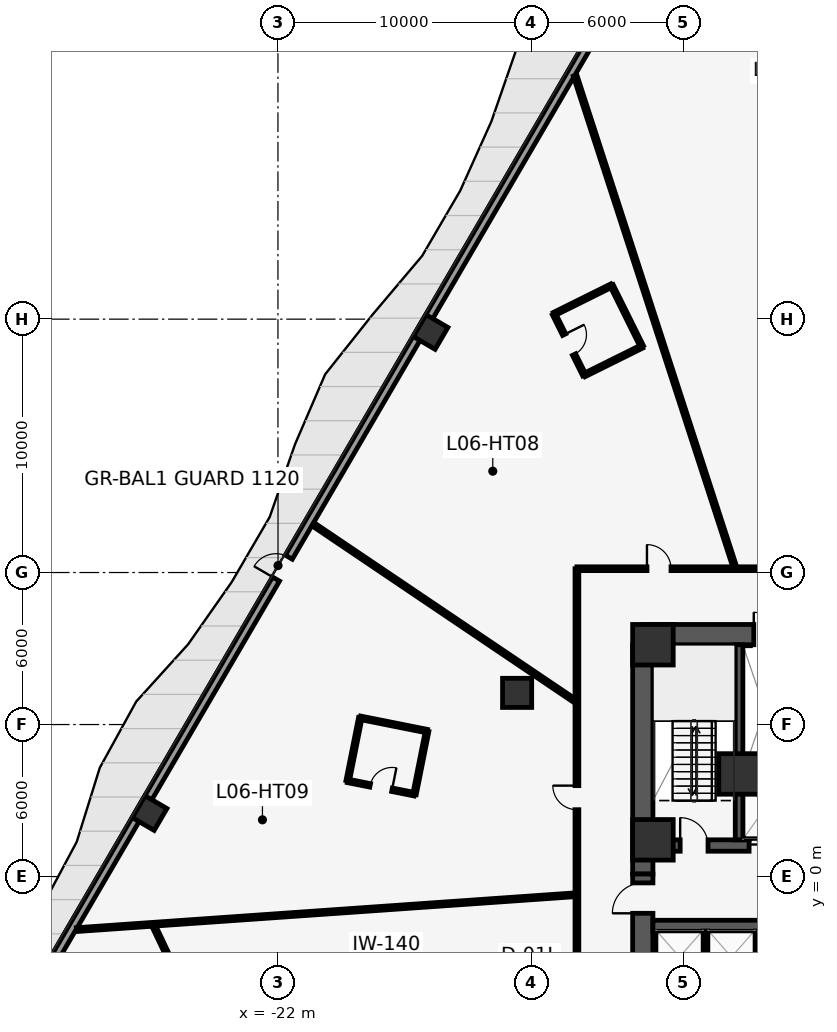
"""IFC4 building model, lengths in metres.
Left out: names, types, materials, properties, quantities, classifications, styles, units other than length and angle.
Written with IfcOpenShell. Run it as: python <this file> out.ifc"""

import sys

from ifc_helpers import new_model, si_unit, direction, frame, frame_2d, origin, origin_2d, place, context, subcontext, project, spatial, rectangle, hollow_rectangle, extrude, element, fill, save


model = new_model("IFC4")
c1 = context("Model", 3, precision=1e-05, world=origin(), true_north=direction((0.0, 1.0)))
c2 = subcontext(c1, "Body", "Model", "MODEL_VIEW")
j1 = project(units=[si_unit("LENGTHUNIT", "METRE"), si_unit("PLANEANGLEUNIT", "RADIAN")], contexts=[c1])
p1 = place(None, origin())
s1 = spatial("IfcSite", under=j1, at=p1, CompositionType="ELEMENT")
p2 = place(p1, origin())
s2 = spatial("IfcBuilding", under=s1, at=p2, CompositionType="ELEMENT")
p3 = place(p2, frame((0.0, 0.0, 34.4)))
s3 = spatial("IfcBuildingStorey", under=s2, at=p3, CompositionType="ELEMENT", Elevation=34.4)
p4 = place(p3, frame((-7.6, 9.55, 0.0), z_axis=(0.0, 0.0, 1.0), x_axis=(1.0, 0.0, 0.0)))
e1 = element("IfcWall", 1, at=p4, inside=s3, PredefinedType="SHEAR", context=c2, shape_type="SweptSolid", body=[
    extrude(rectangle(XDim=15.2, YDim=0.8, at=frame_2d((7.6, 0.0))), origin(), (0.0, 0.0, 1.0), 3.75),
])
p5 = place(p4, frame((7.05, 0.0, 0.0)))
e2 = element("IfcOpeningElement", 2, at=p5, cuts=e1, PredefinedType="OPENING", context=c2, shape_type="SweptSolid", body=[
    extrude(rectangle(XDim=1.1, YDim=2.15, at=frame_2d((0.55, 1.075))), frame((0.0, 0.41, 0.0), z_axis=(0.0, -1.0, 0.0), x_axis=(1.0, 0.0, 0.0)), (0.0, 0.0, 1.0), 0.82),
])
p6 = place(p4, frame((4.38, 0.0, 0.0)))
e3 = element("IfcOpeningElement", 3, at=p6, cuts=e1, PredefinedType="OPENING", context=c2, shape_type="SweptSolid", body=[
    extrude(rectangle(XDim=0.88, YDim=2.15, at=frame_2d((0.44, 1.075))), frame((0.0, 0.41, 0.0), z_axis=(0.0, -1.0, 0.0), x_axis=(1.0, 0.0, 0.0)), (0.0, 0.0, 1.0), 0.82),
])
p7 = place(p4, frame((9.94, 0.0, 0.0)))
e4 = element("IfcOpeningElement", 4, at=p7, cuts=e1, PredefinedType="OPENING", context=c2, shape_type="SweptSolid", body=[
    extrude(rectangle(XDim=0.88, YDim=2.15, at=frame_2d((0.44, 1.075))), frame((0.0, 0.41, 0.0), z_axis=(0.0, -1.0, 0.0), x_axis=(1.0, 0.0, 0.0)), (0.0, 0.0, 1.0), 0.82),
])
p8 = place(p3, frame((-7.2, 1.225, 0.0), z_axis=(0.0, 0.0, 1.0), x_axis=(1.0, 0.0, 0.0)))
e5 = element("IfcWall", 5, at=p8, inside=s3, PredefinedType="SHEAR", context=c2, shape_type="SweptSolid", body=[
    extrude(rectangle(XDim=14.4, YDim=0.45, at=frame_2d((7.2, 0.0))), origin(), (0.0, 0.0, 1.0), 3.75),
])
p9 = place(p8, frame((3.795, 0.0, 0.0)))
e6 = element("IfcOpeningElement", 6, at=p9, cuts=e5, PredefinedType="OPENING", context=c2, shape_type="SweptSolid", body=[
    extrude(rectangle(XDim=1.25, YDim=2.25, at=frame_2d((0.625, 1.125))), frame((0.0, 0.235, 0.0), z_axis=(0.0, -1.0, 0.0), x_axis=(1.0, 0.0, 0.0)), (0.0, 0.0, 1.0), 0.47),
])
p10 = place(p8, frame((9.355, 0.0, 0.0)))
e7 = element("IfcOpeningElement", 7, at=p10, cuts=e5, PredefinedType="OPENING", context=c2, shape_type="SweptSolid", body=[
    extrude(rectangle(XDim=1.25, YDim=2.25, at=frame_2d((0.625, 1.125))), frame((0.0, 0.235, 0.0), z_axis=(0.0, -1.0, 0.0), x_axis=(1.0, 0.0, 0.0)), (0.0, 0.0, 1.0), 0.47),
])
p11 = place(p8, frame((1.075, 0.0, 0.0)))
e8 = element("IfcOpeningElement", 8, at=p11, cuts=e5, PredefinedType="OPENING", context=c2, shape_type="SweptSolid", body=[
    extrude(rectangle(XDim=1.1, YDim=2.15, at=frame_2d((0.55, 1.075))), frame((0.0, 0.235, 0.0), z_axis=(0.0, -1.0, 0.0), x_axis=(1.0, 0.0, 0.0)), (0.0, 0.0, 1.0), 0.47),
])
p12 = place(p8, frame((12.225, 0.0, 0.0)))
e9 = element("IfcOpeningElement", 9, at=p12, cuts=e5, PredefinedType="OPENING", context=c2, shape_type="SweptSolid", body=[
    extrude(rectangle(XDim=1.1, YDim=2.15, at=frame_2d((0.55, 1.075))), frame((0.0, 0.235, 0.0), z_axis=(0.0, -1.0, 0.0), x_axis=(1.0, 0.0, 0.0)), (0.0, 0.0, 1.0), 0.47),
])
p13 = place(p3, frame((-3.8, 1.45, 0.0), z_axis=(0.0, 0.0, 1.0), x_axis=(0.0, 1.0, 0.0)))
e10 = element("IfcWall", 10, at=p13, inside=s3, PredefinedType="SHEAR", context=c2, shape_type="SweptSolid", body=[
    extrude(rectangle(XDim=7.7, YDim=0.3, at=frame_2d((3.85, 0.0))), origin(), (0.0, 0.0, 1.0), 3.75),
])
p14 = place(p3, frame((-7.6, 0.1, 0.0), z_axis=(0.0, 0.0, 1.0), x_axis=(0.0, 1.0, 0.0)))
e11 = element("IfcWall", 11, at=p14, inside=s3, PredefinedType="SHEAR", context=c2, shape_type="SweptSolid", body=[
    extrude(rectangle(XDim=9.05, YDim=0.8, at=frame_2d((4.525, 0.0))), origin(), (0.0, 0.0, 1.0), 3.75),
])
p15 = place(p3, frame((-7.6, -8.85, 0.0), z_axis=(0.0, 0.0, 1.0), x_axis=(0.0, 1.0, 0.0)))
e12 = element("IfcWall", 12, at=p15, inside=s3, PredefinedType="SHEAR", context=c2, shape_type="SweptSolid", body=[
    extrude(rectangle(XDim=8.95, YDim=0.8, at=frame_2d((4.475, 0.0))), origin(), (0.0, 0.0, 1.0), 3.75),
])
p16 = place(p15, frame((2.49, 0.0, 0.0)))
e13 = element("IfcOpeningElement", 13, at=p16, cuts=e12, PredefinedType="OPENING", context=c2, shape_type="SweptSolid", body=[
    extrude(rectangle(XDim=1.8, YDim=2.2, at=frame_2d((0.9, 1.1))), frame((0.0, 0.41, 0.0), z_axis=(0.0, -1.0, 0.0), x_axis=(1.0, 0.0, 0.0)), (0.0, 0.0, 1.0), 0.82),
])
p17 = place(p15, frame((7.4, 0.0, 0.0)))
e14 = element("IfcOpeningElement", 14, at=p17, cuts=e12, PredefinedType="OPENING", context=c2, shape_type="SweptSolid", body=[
    extrude(rectangle(XDim=1.2, YDim=2.15, at=frame_2d((0.6, 1.075))), frame((0.0, 0.41, 0.0), z_axis=(0.0, -1.0, 0.0), x_axis=(1.0, 0.0, 0.0)), (0.0, 0.0, 1.0), 0.82),
])
p18 = place(p3, frame((-7.2, -1.95, 0.0), z_axis=(0.0, 0.0, 1.0), x_axis=(1.0, 0.0, 0.0)))
e15 = element("IfcWall", 15, at=p18, inside=s3, PredefinedType="SHEAR", context=c2, shape_type="SweptSolid", body=[
    extrude(rectangle(XDim=14.4, YDim=0.45, at=frame_2d((7.2, 0.0))), origin(), (0.0, 0.0, 1.0), 3.75),
])
for number, where, z_axis, x_axis in (
    (16, (-7.2, 9.15, 0.0), (0.0, 0.0, 1.0), (1.0, 0.0, 0.0)),
    (17, (-7.2, 1.45, 0.0), (0.0, 0.0, 1.0), (1.0, 0.0, 0.0)),
    (18, (-3.8, 4.05, 0.0), (0.0, 0.0, 1.0), (1.0, 0.0, 0.0)),
):
    element("IfcColumn", number, at=place(p3, frame(where, z_axis=z_axis, x_axis=x_axis)), inside=s3, PredefinedType="COLUMN", context=c2, shape_type="SweptSolid", body=[
        extrude(rectangle(XDim=1.6, YDim=1.6, at=origin_2d()), origin(), (0.0, 0.0, 1.0), 4.0),
    ])
p19 = place(p3, frame((-12.56, 7.25, 0.0), z_axis=(0.0, 0.0, 1.0), x_axis=(1.0, 0.0, 0.0)))
e19 = element("IfcColumn", 19, at=p19, inside=s3, PredefinedType="COLUMN", context=c2, shape_type="SweptSolid", body=[
    extrude(rectangle(XDim=1.15, YDim=1.15, at=origin_2d()), origin(), (0.0, 0.0, 1.0), 4.0),
])
for number, where, z_axis, x_axis in (
    (20, (-15.976, 21.494, 0.0), (0.0, 0.0, 1.0), (0.504, 0.863, 0.0)),
    (21, (-27.065, 2.506, 0.0), (0.0, 0.0, 1.0), (0.504, 0.863, 0.0)),
):
    element("IfcColumn", number, at=place(p3, frame(where, z_axis=z_axis, x_axis=x_axis)), inside=s3, PredefinedType="COLUMN", context=c2, shape_type="SweptSolid", body=[
        extrude(hollow_rectangle(XDim=1.0, YDim=1.0, WallThickness=0.06, at=origin_2d()), origin(), (0.0, 0.0, 1.0), 4.0),
    ])
p20 = place(p3, frame((-38.726, -16.773, 0.0), z_axis=(0.0, 0.0, 1.0), x_axis=(0.504213113214, 0.863579258935, 0.0)))
e22 = element("IfcWall", 22, at=p20, inside=s3, PredefinedType="STANDARD", context=c2, shape_type="SweptSolid", body=[
    extrude(rectangle(XDim=67.041, YDim=0.32, at=frame_2d((33.521, 0.0))), origin(), (0.0, 0.0, 1.0), 3.75),
])
p21 = place(p20, frame((33.021, 0.0, 0.0)))
e23 = element("IfcOpeningElement", 23, at=p21, cuts=e22, PredefinedType="OPENING", context=c2, shape_type="SweptSolid", body=[
    extrude(rectangle(XDim=1.0, YDim=2.15, at=frame_2d((0.5, 1.075))), frame((0.0, 0.17, 0.0), z_axis=(0.0, -1.0, 0.0), x_axis=(1.0, 0.0, 0.0)), (0.0, 0.0, 1.0), 0.34),
])
p22 = place(p3, frame((-3.65, 4.05, 0.0), z_axis=(0.0, 0.0, 1.0), x_axis=(1.0, 0.0, 0.0)))
e24 = element("IfcWall", 24, at=p22, inside=s3, PredefinedType="PARTITIONING", context=c2, shape_type="SweptSolid", body=[
    extrude(rectangle(XDim=1.73, YDim=0.2, at=frame_2d((0.865, 0.0))), origin(), (0.0, 0.0, 1.0), 3.75),
])
for number, where, z_axis, x_axis in (
    (25, (-5.125, -4.18, 0.0), (0.0, 0.0, 1.0), (0.0, 1.0, 0.0)),
    (26, (-3.075, -4.18, 0.0), (0.0, 0.0, 1.0), (0.0, 1.0, 0.0)),
):
    element("IfcWall", number, at=place(p3, frame(where, z_axis=z_axis, x_axis=x_axis)), inside=s3, PredefinedType="PARTITIONING", context=c2, shape_type="SweptSolid", body=[
        extrude(rectangle(XDim=2.03, YDim=0.15, at=frame_2d((1.015, 0.0))), origin(), (0.0, 0.0, 1.0), 3.75),
    ])
p23 = place(p3, frame((-10.2, 12.15, 0.0), z_axis=(0.0, 0.0, 1.0), x_axis=(1.0, 0.0, 0.0)))
e27 = element("IfcWall", 27, at=p23, inside=s3, PredefinedType="PARTITIONING", context=c2, shape_type="SweptSolid", body=[
    extrude(rectangle(XDim=20.4, YDim=0.15, at=frame_2d((10.2, 0.0))), origin(), (0.0, 0.0, 1.0), 3.75),
])
p24 = place(p23, frame((16.686, 0.0, 0.0)))
e28 = element("IfcOpeningElement", 28, at=p24, cuts=e27, PredefinedType="OPENING", context=c2, shape_type="SweptSolid", body=[
    extrude(rectangle(XDim=0.95, YDim=2.15, at=frame_2d((0.475, 1.075))), frame((0.0, 0.085, 0.0), z_axis=(0.0, -1.0, 0.0), x_axis=(1.0, 0.0, 0.0)), (0.0, 0.0, 1.0), 0.17),
])
p25 = place(p23, frame((9.725, 0.0, 0.0)))
e29 = element("IfcOpeningElement", 29, at=p25, cuts=e27, PredefinedType="OPENING", context=c2, shape_type="SweptSolid", body=[
    extrude(rectangle(XDim=0.95, YDim=2.15, at=frame_2d((0.475, 1.075))), frame((0.0, 0.085, 0.0), z_axis=(0.0, -1.0, 0.0), x_axis=(1.0, 0.0, 0.0)), (0.0, 0.0, 1.0), 0.17),
])
p26 = place(p23, frame((2.764, 0.0, 0.0)))
e30 = element("IfcOpeningElement", 30, at=p26, cuts=e27, PredefinedType="OPENING", context=c2, shape_type="SweptSolid", body=[
    extrude(rectangle(XDim=0.95, YDim=2.15, at=frame_2d((0.475, 1.075))), frame((0.0, 0.085, 0.0), z_axis=(0.0, -1.0, 0.0), x_axis=(1.0, 0.0, 0.0)), (0.0, 0.0, 1.0), 0.17),
])
p27 = place(p3, frame((-10.2, -11.85, 0.0), z_axis=(0.0, 0.0, 1.0), x_axis=(0.0, 1.0, 0.0)))
e31 = element("IfcWall", 31, at=p27, inside=s3, PredefinedType="PARTITIONING", context=c2, shape_type="SweptSolid", body=[
    extrude(rectangle(XDim=24.0, YDim=0.15, at=frame_2d((12.0, 0.0))), origin(), (0.0, 0.0, 1.0), 3.75),
])
p28 = place(p27, frame((6.372, 0.0, 0.0)))
e32 = element("IfcOpeningElement", 32, at=p28, cuts=e31, PredefinedType="OPENING", context=c2, shape_type="SweptSolid", body=[
    extrude(rectangle(XDim=0.95, YDim=2.15, at=frame_2d((0.475, 1.075))), frame((0.0, 0.085, 0.0), z_axis=(0.0, -1.0, 0.0), x_axis=(1.0, 0.0, 0.0)), (0.0, 0.0, 1.0), 0.17),
])
p29 = place(p27, frame((14.489, 0.0, 0.0)))
e33 = element("IfcOpeningElement", 33, at=p29, cuts=e31, PredefinedType="OPENING", context=c2, shape_type="SweptSolid", body=[
    extrude(rectangle(XDim=0.95, YDim=2.15, at=frame_2d((0.475, 1.075))), frame((0.0, 0.085, 0.0), z_axis=(0.0, -1.0, 0.0), x_axis=(1.0, 0.0, 0.0)), (0.0, 0.0, 1.0), 0.17),
])
p30 = place(p3, frame((-3.982, 12.255, 0.0), z_axis=(0.0, 0.0, 1.0), x_axis=(-0.309011216684, 0.951058393561, 0.0)))
e34 = element("IfcWall", 34, at=p30, inside=s3, PredefinedType="PARTITIONING", context=c2, shape_type="SweptSolid", body=[
    extrude(rectangle(XDim=20.354, YDim=0.15, at=frame_2d((10.177, 0.0))), origin(), (0.0, 0.0, 1.0), 3.75),
])
p31 = place(p3, frame((-10.305, 6.951, 0.0), z_axis=(0.0, 0.0, 1.0), x_axis=(-0.829038255968, 0.559191890268, 0.0)))
e35 = element("IfcWall", 35, at=p31, inside=s3, PredefinedType="PARTITIONING", context=c2, shape_type="SweptSolid", body=[
    extrude(rectangle(XDim=12.433, YDim=0.15, at=frame_2d((6.216, 0.0))), origin(), (0.0, 0.0, 1.0), 3.75),
])
p32 = place(p3, frame((-10.305, -0.721, 0.0), z_axis=(0.0, 0.0, 1.0), x_axis=(-0.997564481565, -0.069750305525, 0.0)))
e36 = element("IfcWall", 36, at=p32, inside=s3, PredefinedType="PARTITIONING", context=c2, shape_type="SweptSolid", body=[
    extrude(rectangle(XDim=19.696, YDim=0.15, at=frame_2d((9.848, 0.0))), origin(), (0.0, 0.0, 1.0), 3.75),
])
p33 = place(p3, frame((-26.922, -1.908, 0.0), z_axis=(0.0, 0.0, 1.0), x_axis=(0.429066894507, -0.903272716314, 0.0)))
e37 = element("IfcWall", 37, at=p33, inside=s3, PredefinedType="PARTITIONING", context=c2, shape_type="SweptSolid", body=[
    extrude(rectangle(XDim=17.292, YDim=0.15, at=frame_2d((8.646, 0.0))), origin(), (0.0, 0.0, 1.0), 3.75),
])
p34 = place(p33, frame((8.171, 0.0, 0.0)))
e38 = element("IfcOpeningElement", 38, at=p34, cuts=e37, PredefinedType="OPENING", context=c2, shape_type="SweptSolid", body=[
    extrude(rectangle(XDim=0.95, YDim=2.15, at=frame_2d((0.475, 1.075))), frame((0.0, 0.085, 0.0), z_axis=(0.0, -1.0, 0.0), x_axis=(1.0, 0.0, 0.0)), (0.0, 0.0, 1.0), 0.17),
])
p35 = place(p3, frame((-7.635, 20.92, 0.0), z_axis=(0.0, 0.0, 1.0), x_axis=(-0.444598005218, 0.895730212595, 0.0)))
e39 = element("IfcWall", 39, at=p35, inside=s3, PredefinedType="PARTITIONING", context=c2, shape_type="SweptSolid", body=[
    extrude(rectangle(XDim=2.69, YDim=0.14, at=frame_2d((1.345, 0.0))), origin(), (0.0, 0.0, 1.0), 3.75),
])
p36 = place(p3, frame((-8.831, 23.33, 0.0), z_axis=(0.0, 0.0, 1.0), x_axis=(-0.895711445352, -0.444635813521, 0.0)))
e40 = element("IfcWall", 40, at=p36, inside=s3, PredefinedType="PARTITIONING", context=c2, shape_type="SweptSolid", body=[
    extrude(rectangle(XDim=2.54, YDim=0.14, at=frame_2d((1.27, 0.0))), origin(), (0.0, 0.0, 1.0), 3.75),
])
p37 = place(p3, frame((-11.106, 22.2, 0.0), z_axis=(0.0, 0.0, 1.0), x_axis=(0.444706961712, -0.895676123498, 0.0)))
e41 = element("IfcWall", 41, at=p37, inside=s3, PredefinedType="PARTITIONING", context=c2, shape_type="SweptSolid", body=[
    extrude(rectangle(XDim=2.69, YDim=0.14, at=frame_2d((1.345, 0.0))), origin(), (0.0, 0.0, 1.0), 3.75),
])
p38 = place(p37, frame((0.905, 0.0, 0.0)))
e42 = element("IfcOpeningElement", 42, at=p38, cuts=e41, PredefinedType="OPENING", context=c2, shape_type="SweptSolid", body=[
    extrude(rectangle(XDim=0.88, YDim=2.1, at=frame_2d((0.44, 1.05))), frame((0.0, 0.08, 0.0), z_axis=(0.0, -1.0, 0.0), x_axis=(1.0, 0.0, 0.0)), (0.0, 0.0, 1.0), 0.16),
])
p39 = place(p3, frame((-9.909, 19.791, 0.0), z_axis=(0.0, 0.0, 1.0), x_axis=(0.895730724579, 0.444596973726, 0.0)))
e43 = element("IfcWall", 43, at=p39, inside=s3, PredefinedType="PARTITIONING", context=c2, shape_type="SweptSolid", body=[
    extrude(rectangle(XDim=2.54, YDim=0.14, at=frame_2d((1.27, 0.0))), origin(), (0.0, 0.0, 1.0), 3.75),
])
p40 = place(p3, frame((-16.112, 5.74, 0.0), z_axis=(0.0, 0.0, 1.0), x_axis=(-0.980615566205, 0.195941601799, 0.0)))
e44 = element("IfcWall", 44, at=p40, inside=s3, PredefinedType="PARTITIONING", context=c2, shape_type="SweptSolid", body=[
    extrude(rectangle(XDim=2.69, YDim=0.14, at=frame_2d((1.345, 0.0))), origin(), (0.0, 0.0, 1.0), 3.75),
])
p41 = place(p3, frame((-18.75, 6.267, 0.0), z_axis=(0.0, 0.0, 1.0), x_axis=(-0.195986742402, -0.98060654536, 0.0)))
e45 = element("IfcWall", 45, at=p41, inside=s3, PredefinedType="PARTITIONING", context=c2, shape_type="SweptSolid", body=[
    extrude(rectangle(XDim=2.54, YDim=0.14, at=frame_2d((1.27, 0.0))), origin(), (0.0, 0.0, 1.0), 3.75),
])
p42 = place(p3, frame((-19.248, 3.776, 0.0), z_axis=(0.0, 0.0, 1.0), x_axis=(0.980615566205, -0.195941601799, 0.0)))
e46 = element("IfcWall", 46, at=p42, inside=s3, PredefinedType="PARTITIONING", context=c2, shape_type="SweptSolid", body=[
    extrude(rectangle(XDim=2.69, YDim=0.14, at=frame_2d((1.345, 0.0))), origin(), (0.0, 0.0, 1.0), 3.75),
])
p43 = place(p42, frame((0.905, 0.0, 0.0)))
e47 = element("IfcOpeningElement", 47, at=p43, cuts=e46, PredefinedType="OPENING", context=c2, shape_type="SweptSolid", body=[
    extrude(rectangle(XDim=0.88, YDim=2.1, at=frame_2d((0.44, 1.05))), frame((0.0, 0.08, 0.0), z_axis=(0.0, -1.0, 0.0), x_axis=(1.0, 0.0, 0.0)), (0.0, 0.0, 1.0), 0.16),
])
p44 = place(p3, frame((-16.61, 3.249, 0.0), z_axis=(0.0, 0.0, 1.0), x_axis=(0.195986742402, 0.98060654536, 0.0)))
e48 = element("IfcWall", 48, at=p44, inside=s3, PredefinedType="PARTITIONING", context=c2, shape_type="SweptSolid", body=[
    extrude(rectangle(XDim=2.54, YDim=0.14, at=frame_2d((1.27, 0.0))), origin(), (0.0, 0.0, 1.0), 3.75),
])
p45 = place(p21, origin())
e49 = element("IfcDoor", 49, at=p45, inside=s3, OperationType="SINGLE_SWING_LEFT", PredefinedType="DOOR", context=c2, shape_type="SweptSolid", body=[
    extrude(rectangle(XDim=1.0, YDim=2.15, at=frame_2d((0.5, 1.075))), frame((0.0, 0.025, 0.0), z_axis=(0.0, -1.0, 0.0), x_axis=(1.0, 0.0, 0.0)), (0.0, 0.0, 1.0), 0.05),
])
fill(e23, e49)
p46 = place(p9, origin())
e50 = element("IfcDoor", 50, at=p46, inside=s3, OperationType="DOUBLE_DOOR_SLIDING", PredefinedType="DOOR", context=c2, shape_type="SweptSolid", body=[
    extrude(rectangle(XDim=1.25, YDim=2.25, at=frame_2d((0.625, 1.125))), frame((0.0, 0.025, 0.0), z_axis=(0.0, -1.0, 0.0), x_axis=(1.0, 0.0, 0.0)), (0.0, 0.0, 1.0), 0.05),
])
fill(e6, e50)
p47 = place(p11, origin())
e51 = element("IfcDoor", 51, at=p47, inside=s3, OperationType="SINGLE_SWING_LEFT", PredefinedType="DOOR", context=c2, shape_type="SweptSolid", body=[
    extrude(rectangle(XDim=1.1, YDim=2.15, at=frame_2d((0.55, 1.075))), frame((0.0, 0.025, 0.0), z_axis=(0.0, -1.0, 0.0), x_axis=(1.0, 0.0, 0.0)), (0.0, 0.0, 1.0), 0.05),
])
fill(e8, e51)
p48 = place(p6, origin())
e52 = element("IfcDoor", 52, at=p48, inside=s3, OperationType="SINGLE_SWING_LEFT", PredefinedType="DOOR", context=c2, shape_type="SweptSolid", body=[
    extrude(rectangle(XDim=0.88, YDim=2.15, at=frame_2d((0.44, 1.075))), frame((0.0, 0.025, 0.0), z_axis=(0.0, -1.0, 0.0), x_axis=(1.0, 0.0, 0.0)), (0.0, 0.0, 1.0), 0.05),
])
fill(e3, e52)
p49 = place(p17, origin())
e53 = element("IfcDoor", 53, at=p49, inside=s3, OperationType="SINGLE_SWING_LEFT", PredefinedType="DOOR", context=c2, shape_type="SweptSolid", body=[
    extrude(rectangle(XDim=1.2, YDim=2.15, at=frame_2d((0.6, 1.075))), frame((0.0, 0.025, 0.0), z_axis=(0.0, -1.0, 0.0), x_axis=(1.0, 0.0, 0.0)), (0.0, 0.0, 1.0), 0.05),
])
fill(e14, e53)
p50 = place(p38, origin())
e54 = element("IfcDoor", 54, at=p50, inside=s3, OperationType="SINGLE_SWING_LEFT", PredefinedType="DOOR", context=c2, shape_type="SweptSolid", body=[
    extrude(rectangle(XDim=0.88, YDim=2.1, at=frame_2d((0.44, 1.05))), frame((0.0, 0.025, 0.0), z_axis=(0.0, -1.0, 0.0), x_axis=(1.0, 0.0, 0.0)), (0.0, 0.0, 1.0), 0.05),
])
fill(e42, e54)
p51 = place(p43, origin())
e55 = element("IfcDoor", 55, at=p51, inside=s3, OperationType="SINGLE_SWING_RIGHT", PredefinedType="DOOR", context=c2, shape_type="SweptSolid", body=[
    extrude(rectangle(XDim=0.88, YDim=2.1, at=frame_2d((0.44, 1.05))), frame((0.0, 0.025, 0.0), z_axis=(0.0, -1.0, 0.0), x_axis=(1.0, 0.0, 0.0)), (0.0, 0.0, 1.0), 0.05),
])
fill(e47, e55)
p52 = place(p26, origin())
e56 = element("IfcDoor", 56, at=p52, inside=s3, OperationType="SINGLE_SWING_LEFT", PredefinedType="DOOR", context=c2, shape_type="SweptSolid", body=[
    extrude(rectangle(XDim=0.95, YDim=2.15, at=frame_2d((0.475, 1.075))), frame((0.0, 0.025, 0.0), z_axis=(0.0, -1.0, 0.0), x_axis=(1.0, 0.0, 0.0)), (0.0, 0.0, 1.0), 0.05),
])
fill(e30, e56)
p53 = place(p29, origin())
e57 = element("IfcDoor", 57, at=p53, inside=s3, OperationType="SINGLE_SWING_RIGHT", PredefinedType="DOOR", context=c2, shape_type="SweptSolid", body=[
    extrude(rectangle(XDim=0.95, YDim=2.15, at=frame_2d((0.475, 1.075))), frame((0.0, 0.025, 0.0), z_axis=(0.0, -1.0, 0.0), x_axis=(1.0, 0.0, 0.0)), (0.0, 0.0, 1.0), 0.05),
])
fill(e33, e57)
save(model, sys.argv[1])
